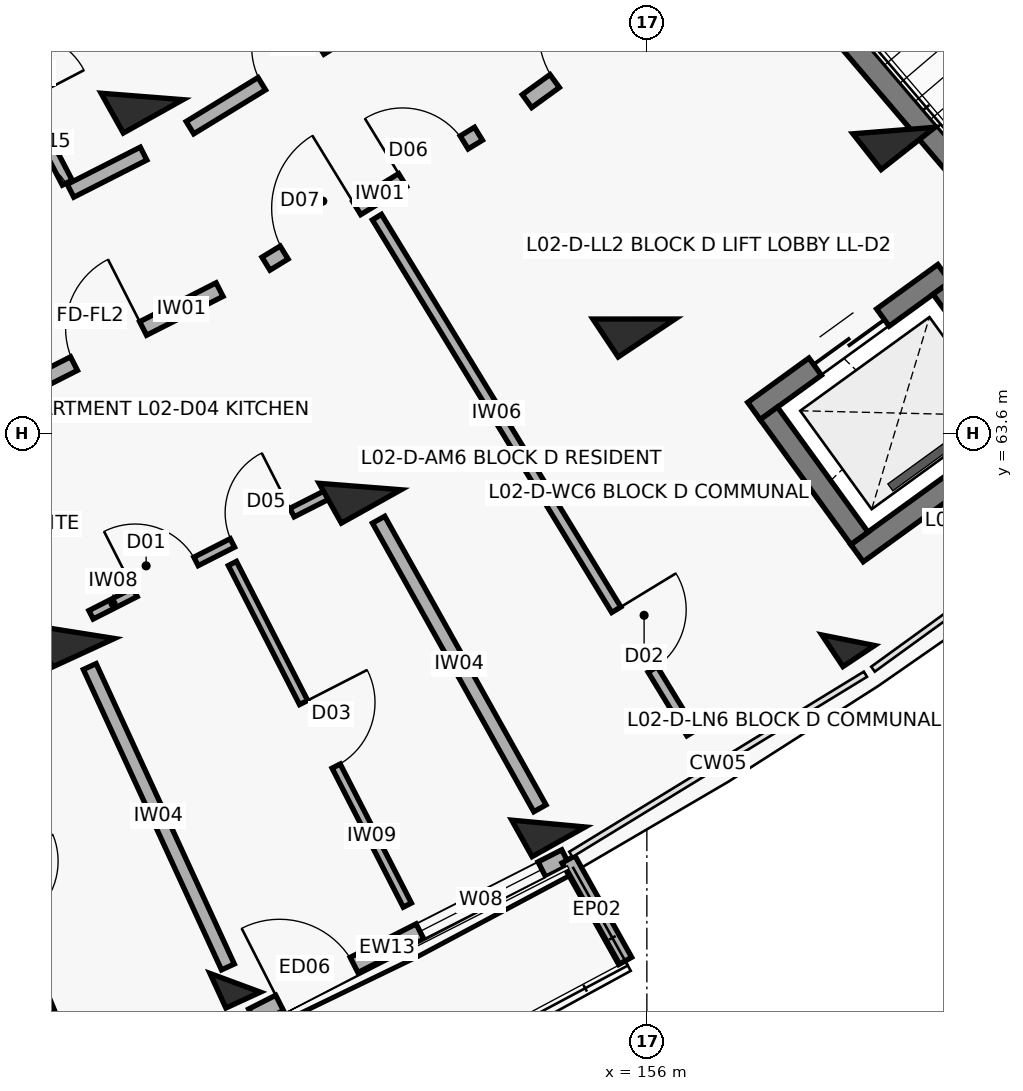
"""IFC4 building model, lengths in metres.
Left out: names, types, materials, properties, quantities, classifications, styles, units other than length and angle.
Written with IfcOpenShell. Run it as: python <this file> out.ifc"""

import sys

from ifc_helpers import new_model, si_unit, direction, frame, frame_2d, origin, origin_2d, place, context, subcontext, project, spatial, rectangle, extrude, element, fill, save


model = new_model("IFC4")
c1 = context("Model", 3, precision=1e-05, world=origin(), true_north=direction((0.0, 1.0)))
c2 = subcontext(c1, "Body", "Model", "MODEL_VIEW")
j1 = project(units=[si_unit("LENGTHUNIT", "METRE"), si_unit("PLANEANGLEUNIT", "RADIAN")], contexts=[c1])
p1 = place(None, origin())
s1 = spatial("IfcSite", under=j1, at=p1, CompositionType="ELEMENT")
p2 = place(p1, origin())
s2 = spatial("IfcBuilding", under=s1, at=p2, CompositionType="ELEMENT")
p3 = place(p2, frame((0.0, 0.0, 8.1)))
s3 = spatial("IfcBuildingStorey", under=s2, at=p3, CompositionType="ELEMENT", Elevation=8.1)
p4 = place(p3, frame((148.461, 60.982, 0.0), z_axis=(0.0, 0.0, 1.0), x_axis=(0.417867073801, -0.908508177527, 0.0)))
e1 = element("IfcColumn", 1, at=p4, inside=s3, PredefinedType="COLUMN", context=c2, shape_type="SweptSolid", body=[
    extrude(rectangle(XDim=0.6, YDim=0.9, at=origin_2d()), origin(), (0.0, 0.0, 1.0), 3.1),
])
p5 = place(p3, frame((150.584, 56.367, 0.0), z_axis=(0.0, 0.0, 1.0), x_axis=(0.417867073801, -0.908508177527, 0.0)))
e2 = element("IfcColumn", 2, at=p5, inside=s3, PredefinedType="COLUMN", context=c2, shape_type="SweptSolid", body=[
    extrude(rectangle(XDim=0.5, YDim=0.5, at=origin_2d()), origin(), (0.0, 0.0, 1.0), 3.1),
])
for number, where, z_axis, x_axis in (
    (3, (149.358, 68.03, 0.0), (0.0, 0.0, 1.0), (0.488, -0.873, 0.0)),
    (4, (152.227, 62.897, 0.0), (0.0, 0.0, 1.0), (0.488, -0.873, 0.0)),
):
    element("IfcColumn", number, at=place(p3, frame(where, z_axis=z_axis, x_axis=x_axis)), inside=s3, PredefinedType="COLUMN", context=c2, shape_type="SweptSolid", body=[
        extrude(rectangle(XDim=0.6, YDim=0.9, at=origin_2d()), origin(), (0.0, 0.0, 1.0), 3.1),
    ])
p6 = place(p3, frame((154.705, 58.462, 0.0), z_axis=(0.0, 0.0, 1.0), x_axis=(0.487859659139, -0.87292207727, 0.0)))
e5 = element("IfcColumn", 5, at=p6, inside=s3, PredefinedType="COLUMN", context=c2, shape_type="SweptSolid", body=[
    extrude(rectangle(XDim=0.55, YDim=0.8, at=origin_2d()), origin(), (0.0, 0.0, 1.0), 3.1),
])
p7 = place(p3, frame((155.831, 65.101, 0.0), z_axis=(0.0, 0.0, 1.0), x_axis=(0.554844427448, -0.83195412213, 0.0)))
e6 = element("IfcColumn", 6, at=p7, inside=s3, PredefinedType="COLUMN", context=c2, shape_type="SweptSolid", body=[
    extrude(rectangle(XDim=0.6, YDim=0.9, at=origin_2d()), origin(), (0.0, 0.0, 1.0), 3.1),
])
p8 = place(p3, frame((158.649, 60.875, 0.0), z_axis=(0.0, 0.0, 1.0), x_axis=(0.554844427448, -0.83195412213, 0.0)))
e7 = element("IfcColumn", 7, at=p8, inside=s3, PredefinedType="COLUMN", context=c2, shape_type="SweptSolid", body=[
    extrude(rectangle(XDim=0.5, YDim=0.5, at=origin_2d()), origin(), (0.0, 0.0, 1.0), 3.1),
])
p9 = place(p3, frame((159.25, 67.581, 0.0), z_axis=(0.0, 0.0, 1.0), x_axis=(0.618408395358, -0.785856893175, 0.0)))
e8 = element("IfcColumn", 8, at=p9, inside=s3, PredefinedType="COLUMN", context=c2, shape_type="SweptSolid", body=[
    extrude(rectangle(XDim=0.6, YDim=0.9, at=origin_2d()), origin(), (0.0, 0.0, 1.0), 3.1),
])
p10 = place(p3, frame((150.811, 55.922, 0.0), z_axis=(0.0, 0.0, 1.0), x_axis=(0.891407190547, 0.453203288428, 0.0)))
e9 = element("IfcWall", 9, at=p10, inside=s3, PredefinedType="SOLIDWALL", context=c2, shape_type="SweptSolid", body=[
    extrude(rectangle(XDim=4.623, YDim=0.224, at=frame_2d((2.311, 0.0))), origin(), (0.0, 0.0, 1.0), 2.25),
])
p11 = place(p10, frame((0.4, 0.0, 0.0)))
e10 = element("IfcOpeningElement", 10, at=p11, cuts=e9, PredefinedType="OPENING", context=c2, shape_type="SweptSolid", body=[
    extrude(rectangle(XDim=1.1, YDim=2.15, at=frame_2d((0.55, 1.075))), frame((0.0, 0.122, 0.0), z_axis=(0.0, -1.0, 0.0), x_axis=(1.0, 0.0, 0.0)), (0.0, 0.0, 1.0), 0.244),
])
p12 = place(p10, frame((2.472, 0.0, 0.35)))
e11 = element("IfcOpeningElement", 11, at=p12, cuts=e9, PredefinedType="OPENING", context=c2, shape_type="SweptSolid", body=[
    extrude(rectangle(XDim=1.8, YDim=1.65, at=frame_2d((0.9, 0.825))), frame((0.0, 0.122, 0.0), z_axis=(0.0, -1.0, 0.0), x_axis=(1.0, 0.0, 0.0)), (0.0, 0.0, 1.0), 0.244),
])
p13 = place(p3, frame((154.969, 57.991, 0.0), z_axis=(0.0, 0.0, 1.0), x_axis=(0.487971560724, -0.872859528175, 0.0)))
e12 = element("IfcWall", 12, at=p13, inside=s3, PredefinedType="PARAPET", context=c2, shape_type="SweptSolid", body=[
    extrude(rectangle(XDim=1.53, YDim=0.195, at=frame_2d((0.765, 0.0))), origin(), (0.0, 0.0, 1.0), 2.25),
])
p14 = place(p3, frame((157.583, 70.041, 0.0), z_axis=(0.0, 0.0, 1.0), x_axis=(0.648762810187, -0.760990680704, 0.0)))
e13 = element("IfcWall", 13, at=p14, inside=s3, PredefinedType="SHEAR", context=c2, shape_type="SweptSolid", body=[
    extrude(rectangle(XDim=7.69, YDim=0.3, at=frame_2d((3.845, 0.0))), origin(), (0.0, 0.0, 1.0), 3.1),
])
p15 = place(p3, frame((157.409, 63.89, 0.0), z_axis=(0.0, 0.0, 1.0), x_axis=(0.809510936031, 0.587104798521, 0.0)))
e14 = element("IfcWall", 14, at=p15, inside=s3, PredefinedType="SHEAR", context=c2, shape_type="SweptSolid", body=[
    extrude(rectangle(XDim=3.09, YDim=0.28, at=frame_2d((1.545, 0.0))), origin(), (0.0, 0.0, 1.0), 3.1),
])
p16 = place(p15, frame((0.995, 0.0, 0.0)))
e15 = element("IfcOpeningElement", 15, at=p16, cuts=e14, PredefinedType="OPENING", context=c2, shape_type="SweptSolid", body=[
    extrude(rectangle(XDim=1.1, YDim=2.15, at=frame_2d((0.55, 1.075))), frame((0.0, 0.15, 0.0), z_axis=(0.0, -1.0, 0.0), x_axis=(1.0, 0.0, 0.0)), (0.0, 0.0, 1.0), 0.3),
])
p17 = place(p3, frame((158.765, 62.021, 0.0), z_axis=(0.0, 0.0, 1.0), x_axis=(0.809548485838, 0.587053020669, 0.0)))
e16 = element("IfcWall", 16, at=p17, inside=s3, PredefinedType="SHEAR", context=c2, shape_type="SweptSolid", body=[
    extrude(rectangle(XDim=3.09, YDim=0.28, at=frame_2d((1.545, 0.0))), origin(), (0.0, 0.0, 1.0), 3.1),
])
p18 = place(p3, frame((157.604, 63.859, 0.0), z_axis=(0.0, 0.0, 1.0), x_axis=(0.587127188998, -0.809494696671, 0.0)))
e17 = element("IfcWall", 17, at=p18, inside=s3, PredefinedType="SHEAR", context=c2, shape_type="SweptSolid", body=[
    extrude(rectangle(XDim=2.03, YDim=0.28, at=frame_2d((1.015, 0.0))), origin(), (0.0, 0.0, 1.0), 3.1),
])
p19 = place(p3, frame((159.879, 65.509, 0.0), z_axis=(0.0, 0.0, 1.0), x_axis=(0.58704837408, -0.809551855344, 0.0)))
e18 = element("IfcWall", 18, at=p19, inside=s3, PredefinedType="SHEAR", context=c2, shape_type="SweptSolid", body=[
    extrude(rectangle(XDim=2.03, YDim=0.28, at=frame_2d((1.015, 0.0))), origin(), (0.0, 0.0, 1.0), 3.1),
])
p20 = place(p3, frame((144.903, 59.296, 0.0), z_axis=(0.0, 0.0, 1.0), x_axis=(0.924207914011, 0.381889685223, 0.0)))
e19 = element("IfcWall", 19, at=p20, inside=s3, PredefinedType="PARTITIONING", context=c2, shape_type="SweptSolid", body=[
    extrude(rectangle(XDim=3.64, YDim=0.13, at=frame_2d((1.82, 0.0))), origin(), (0.0, 0.0, 1.0), 2.08),
])
p21 = place(p20, frame((0.65, 0.0, 0.0)))
e20 = element("IfcOpeningElement", 20, at=p21, cuts=e19, PredefinedType="OPENING", context=c2, shape_type="SweptSolid", body=[
    extrude(rectangle(XDim=0.9, YDim=2.1, at=frame_2d((0.45, 1.05))), frame((0.0, 0.075, 0.0), z_axis=(0.0, -1.0, 0.0), x_axis=(1.0, 0.0, 0.0)), (0.0, 0.0, 1.0), 0.15),
])
p22 = place(p20, frame((2.11, 0.0, 0.0)))
e21 = element("IfcOpeningElement", 21, at=p22, cuts=e19, PredefinedType="OPENING", context=c2, shape_type="SweptSolid", body=[
    extrude(rectangle(XDim=0.88, YDim=2.1, at=frame_2d((0.44, 1.05))), frame((0.0, 0.075, 0.0), z_axis=(0.0, -1.0, 0.0), x_axis=(1.0, 0.0, 0.0)), (0.0, 0.0, 1.0), 0.15),
])
p23 = place(p3, frame((146.605, 59.738, 0.0), z_axis=(0.0, 0.0, 1.0), x_axis=(0.380553327256, -0.924758976769, 0.0)))
e22 = element("IfcWall", 22, at=p23, inside=s3, PredefinedType="PARTITIONING", context=c2, shape_type="SweptSolid", body=[
    extrude(rectangle(XDim=4.75, YDim=0.12, at=frame_2d((2.375, 0.0))), origin(), (0.0, 0.0, 1.0), 2.08),
])
p24 = place(p23, frame((1.915, 0.0, 0.0)))
e23 = element("IfcOpeningElement", 23, at=p24, cuts=e22, PredefinedType="OPENING", context=c2, shape_type="SweptSolid", body=[
    extrude(rectangle(XDim=0.92, YDim=2.1, at=frame_2d((0.46, 1.05))), frame((0.0, 0.07, 0.0), z_axis=(0.0, -1.0, 0.0), x_axis=(1.0, 0.0, 0.0)), (0.0, 0.0, 1.0), 0.14),
])
p25 = place(p3, frame((147.457, 64.003, 0.0), z_axis=(0.0, 0.0, 1.0), x_axis=(0.891412167565, 0.45319349898, 0.0)))
e24 = element("IfcWall", 24, at=p25, inside=s3, PredefinedType="SOLIDWALL", context=c2, shape_type="SweptSolid", body=[
    extrude(rectangle(XDim=3.277, YDim=0.2, at=frame_2d((1.639, 0.0))), origin(), (0.0, 0.0, 1.0), 2.08),
])
p26 = place(p25, frame((1.128, 0.0, 0.0)))
e25 = element("IfcOpeningElement", 25, at=p26, cuts=e24, PredefinedType="OPENING", context=c2, shape_type="SweptSolid", body=[
    extrude(rectangle(XDim=1.02, YDim=2.15, at=frame_2d((0.51, 1.075))), frame((0.0, 0.11, 0.0), z_axis=(0.0, -1.0, 0.0), x_axis=(1.0, 0.0, 0.0)), (0.0, 0.0, 1.0), 0.22),
])
p27 = place(p3, frame((146.6, 65.865, 0.0), z_axis=(0.0, 0.0, 1.0), x_axis=(0.891414101388, 0.453189695212, 0.0)))
e26 = element("IfcWall", 26, at=p27, inside=s3, PredefinedType="SOLIDWALL", context=c2, shape_type="SweptSolid", body=[
    extrude(rectangle(XDim=3.116, YDim=0.19, at=frame_2d((1.558, 0.0))), origin(), (0.0, 0.0, 1.0), 2.08),
])
p28 = place(p27, frame((1.078, 0.0, 0.0)))
e27 = element("IfcOpeningElement", 27, at=p28, cuts=e26, PredefinedType="OPENING", context=c2, shape_type="SweptSolid", body=[
    extrude(rectangle(XDim=0.96, YDim=2.1, at=frame_2d((0.48, 1.05))), frame((0.0, 0.105, 0.0), z_axis=(0.0, -1.0, 0.0), x_axis=(1.0, 0.0, 0.0)), (0.0, 0.0, 1.0), 0.21),
])
p29 = place(p3, frame((146.849, 69.822, 0.0), z_axis=(0.0, 0.0, 1.0), x_axis=(0.462242343884, -0.886753638572, 0.0)))
e28 = element("IfcWall", 28, at=p29, inside=s3, PredefinedType="PARTITIONING", context=c2, shape_type="SweptSolid", body=[
    extrude(rectangle(XDim=3.3, YDim=0.145, at=frame_2d((1.65, 0.0))), origin(), (0.0, 0.0, 1.0), 2.08),
])
p30 = place(p29, frame((1.21, 0.0, 0.0)))
e29 = element("IfcOpeningElement", 29, at=p30, cuts=e28, PredefinedType="OPENING", context=c2, shape_type="SweptSolid", body=[
    extrude(rectangle(XDim=0.88, YDim=2.1, at=frame_2d((0.44, 1.05))), frame((0.0, 0.083, 0.0), z_axis=(0.0, -1.0, 0.0), x_axis=(1.0, 0.0, 0.0)), (0.0, 0.0, 1.0), 0.165),
])
p31 = place(p3, frame((148.687, 61.209, 0.0), z_axis=(0.0, 0.0, 1.0), x_axis=(0.891396224028, 0.453224857866, 0.0)))
e30 = element("IfcWall", 30, at=p31, inside=s3, PredefinedType="PARTITIONING", context=c2, shape_type="SweptSolid", body=[
    extrude(rectangle(XDim=3.617, YDim=0.125, at=frame_2d((1.808, 0.0))), origin(), (0.0, 0.0, 1.0), 2.08),
])
p32 = place(p31, frame((0.65, 0.0, 0.0)))
e31 = element("IfcOpeningElement", 31, at=p32, cuts=e30, PredefinedType="OPENING", context=c2, shape_type="SweptSolid", body=[
    extrude(rectangle(XDim=0.9, YDim=2.1, at=frame_2d((0.45, 1.05))), frame((0.0, 0.073, 0.0), z_axis=(0.0, -1.0, 0.0), x_axis=(1.0, 0.0, 0.0)), (0.0, 0.0, 1.0), 0.145),
])
p33 = place(p31, frame((2.086, 0.0, 0.0)))
e32 = element("IfcOpeningElement", 32, at=p33, cuts=e30, PredefinedType="OPENING", context=c2, shape_type="SweptSolid", body=[
    extrude(rectangle(XDim=0.88, YDim=2.1, at=frame_2d((0.44, 1.05))), frame((0.0, 0.073, 0.0), z_axis=(0.0, -1.0, 0.0), x_axis=(1.0, 0.0, 0.0)), (0.0, 0.0, 1.0), 0.145),
])
p34 = place(p3, frame((150.547, 61.884, 0.0), z_axis=(0.0, 0.0, 1.0), x_axis=(0.455778725258, -0.89009311513, 0.0)))
e33 = element("IfcWall", 33, at=p34, inside=s3, PredefinedType="PARTITIONING", context=c2, shape_type="SweptSolid", body=[
    extrude(rectangle(XDim=5.05, YDim=0.12, at=frame_2d((2.525, 0.0))), origin(), (0.0, 0.0, 1.0), 2.08),
])
p35 = place(p34, frame((2.055, 0.0, 0.0)))
e34 = element("IfcOpeningElement", 34, at=p35, cuts=e33, PredefinedType="OPENING", context=c2, shape_type="SweptSolid", body=[
    extrude(rectangle(XDim=0.94, YDim=2.1, at=frame_2d((0.47, 1.05))), frame((0.0, 0.07, 0.0), z_axis=(0.0, -1.0, 0.0), x_axis=(1.0, 0.0, 0.0)), (0.0, 0.0, 1.0), 0.14),
])
p36 = place(p3, frame((148.67, 60.528, 0.0), z_axis=(0.0, 0.0, 1.0), x_axis=(0.417837051164, -0.908521985796, 0.0)))
e35 = element("IfcWall", 35, at=p36, inside=s3, PredefinedType="SOLIDWALL", context=c2, shape_type="SweptSolid", body=[
    extrude(rectangle(XDim=4.35, YDim=0.185, at=frame_2d((2.175, 0.0))), origin(), (0.0, 0.0, 1.0), 2.08),
])
p37 = place(p3, frame((150.989, 65.829, 0.0), z_axis=(0.0, 0.0, 1.0), x_axis=(0.853090237845, 0.521763400492, 0.0)))
e36 = element("IfcWall", 36, at=p37, inside=s3, PredefinedType="SOLIDWALL", context=c2, shape_type="SweptSolid", body=[
    extrude(rectangle(XDim=3.277, YDim=0.2, at=frame_2d((1.638, 0.0))), origin(), (0.0, 0.0, 1.0), 2.08),
])
p38 = place(p37, frame((0.28, 0.0, 0.0)))
e37 = element("IfcOpeningElement", 37, at=p38, cuts=e36, PredefinedType="OPENING", context=c2, shape_type="SweptSolid", body=[
    extrude(rectangle(XDim=1.12, YDim=2.15, at=frame_2d((0.56, 1.075))), frame((0.0, 0.11, 0.0), z_axis=(0.0, -1.0, 0.0), x_axis=(1.0, 0.0, 0.0)), (0.0, 0.0, 1.0), 0.22),
])
p39 = place(p37, frame((2.107, 0.0, 0.0)))
e38 = element("IfcOpeningElement", 38, at=p39, cuts=e36, PredefinedType="OPENING", context=c2, shape_type="SweptSolid", body=[
    extrude(rectangle(XDim=0.95, YDim=2.1, at=frame_2d((0.475, 1.05))), frame((0.0, 0.11, 0.0), z_axis=(0.0, -1.0, 0.0), x_axis=(1.0, 0.0, 0.0)), (0.0, 0.0, 1.0), 0.22),
])
p40 = place(p3, frame((149.989, 67.619, 0.0), z_axis=(0.0, 0.0, 1.0), x_axis=(0.853121049608, 0.5217130195, 0.0)))
e39 = element("IfcWall", 39, at=p40, inside=s3, PredefinedType="SOLIDWALL", context=c2, shape_type="SweptSolid", body=[
    extrude(rectangle(XDim=3.116, YDim=0.19, at=frame_2d((1.558, 0.0))), origin(), (0.0, 0.0, 1.0), 2.08),
])
p41 = place(p40, frame((1.108, 0.0, 0.0)))
e40 = element("IfcOpeningElement", 40, at=p41, cuts=e39, PredefinedType="OPENING", context=c2, shape_type="SweptSolid", body=[
    extrude(rectangle(XDim=0.9, YDim=2.1, at=frame_2d((0.45, 1.05))), frame((0.0, 0.105, 0.0), z_axis=(0.0, -1.0, 0.0), x_axis=(1.0, 0.0, 0.0)), (0.0, 0.0, 1.0), 0.21),
])
p42 = place(p3, frame((152.448, 66.442, 0.0), z_axis=(0.0, 0.0, 1.0), x_axis=(0.520511872578, -0.853854431683, 0.0)))
e41 = element("IfcWall", 41, at=p42, inside=s3, PredefinedType="PARTITIONING", context=c2, shape_type="SweptSolid", body=[
    extrude(rectangle(XDim=7.95, YDim=0.14, at=frame_2d((3.975, 0.0))), origin(), (0.0, 0.0, 1.0), 2.08),
])
p43 = place(p42, frame((6.05, 0.0, 0.0)))
e42 = element("IfcOpeningElement", 42, at=p43, cuts=e41, PredefinedType="OPENING", context=c2, shape_type="SweptSolid", body=[
    extrude(rectangle(XDim=0.92, YDim=2.1, at=frame_2d((0.46, 1.05))), frame((0.0, 0.08, 0.0), z_axis=(0.0, -1.0, 0.0), x_axis=(1.0, 0.0, 0.0)), (0.0, 0.0, 1.0), 0.16),
])
p44 = place(p3, frame((152.471, 62.46, 0.0), z_axis=(0.0, 0.0, 1.0), x_axis=(0.487866639184, -0.872918176218, 0.0)))
e43 = element("IfcWall", 43, at=p44, inside=s3, PredefinedType="SOLIDWALL", context=c2, shape_type="SweptSolid", body=[
    extrude(rectangle(XDim=4.35, YDim=0.185, at=frame_2d((2.175, 0.0))), origin(), (0.0, 0.0, 1.0), 2.08),
])
p45 = place(p3, frame((154.423, 67.968, 0.0), z_axis=(0.0, 0.0, 1.0), x_axis=(0.809516127005, 0.587097641043, 0.0)))
e44 = element("IfcWall", 44, at=p45, inside=s3, PredefinedType="SOLIDWALL", context=c2, shape_type="SweptSolid", body=[
    extrude(rectangle(XDim=3.137, YDim=0.21, at=frame_2d((1.569, 0.0))), origin(), (0.0, 0.0, 1.0), 2.08),
])
p46 = place(p45, frame((0.45, 0.0, 0.0)))
e45 = element("IfcOpeningElement", 45, at=p46, cuts=e44, PredefinedType="OPENING", context=c2, shape_type="SweptSolid", body=[
    extrude(rectangle(XDim=1.1, YDim=2.15, at=frame_2d((0.55, 1.075))), frame((0.0, 0.115, 0.0), z_axis=(0.0, -1.0, 0.0), x_axis=(1.0, 0.0, 0.0)), (0.0, 0.0, 1.0), 0.23),
])
p47 = place(p45, frame((1.567, 0.0, 0.0)))
e46 = element("IfcOpeningElement", 46, at=p47, cuts=e44, PredefinedType="OPENING", context=c2, shape_type="SweptSolid", body=[
    extrude(rectangle(XDim=1.12, YDim=2.15, at=frame_2d((0.56, 1.075))), frame((0.0, 0.115, 0.0), z_axis=(0.0, -1.0, 0.0), x_axis=(1.0, 0.0, 0.0)), (0.0, 0.0, 1.0), 0.23),
])
p48 = place(p11, origin())
e47 = element("IfcDoor", 47, at=p48, inside=s3, OperationType="SINGLE_SWING_LEFT", PredefinedType="DOOR", context=c2, shape_type="SweptSolid", body=[
    extrude(rectangle(XDim=1.1, YDim=2.15, at=frame_2d((0.55, 1.075))), frame((0.0, 0.025, 0.0), z_axis=(0.0, -1.0, 0.0), x_axis=(1.0, 0.0, 0.0)), (0.0, 0.0, 1.0), 0.05),
])
fill(e10, e47)
p49 = place(p12, origin())
e48 = element("IfcWindow", 48, at=p49, inside=s3, PartitioningType="TRIPLE_PANEL_VERTICAL", PredefinedType="WINDOW", context=c2, shape_type="SweptSolid", body=[
    extrude(rectangle(XDim=1.8, YDim=1.65, at=frame_2d((0.9, 0.825))), frame((0.0, 0.03, 0.0), z_axis=(0.0, -1.0, 0.0), x_axis=(1.0, 0.0, 0.0)), (0.0, 0.0, 1.0), 0.06),
])
fill(e11, e48)
p50 = place(p16, origin())
e49 = element("IfcDoor", 49, at=p50, inside=s3, OperationType="DOUBLE_DOOR_SLIDING", PredefinedType="DOOR", context=c2, shape_type="SweptSolid", body=[
    extrude(rectangle(XDim=1.1, YDim=2.15, at=frame_2d((0.55, 1.075))), frame((0.0, 0.025, 0.0), z_axis=(0.0, -1.0, 0.0), x_axis=(1.0, 0.0, 0.0)), (0.0, 0.0, 1.0), 0.05),
])
fill(e15, e49)
p51 = place(p26, origin())
e50 = element("IfcDoor", 50, at=p51, inside=s3, OperationType="SINGLE_SWING_RIGHT", PredefinedType="DOOR", context=c2, shape_type="SweptSolid", body=[
    extrude(rectangle(XDim=1.02, YDim=2.15, at=frame_2d((0.51, 1.075))), frame((0.0, 0.025, 0.0), z_axis=(0.0, -1.0, 0.0), x_axis=(1.0, 0.0, 0.0)), (0.0, 0.0, 1.0), 0.05),
])
fill(e25, e50)
p52 = place(p28, origin())
e51 = element("IfcDoor", 51, at=p52, inside=s3, OperationType="SINGLE_SWING_LEFT", PredefinedType="DOOR", context=c2, shape_type="SweptSolid", body=[
    extrude(rectangle(XDim=0.96, YDim=2.1, at=frame_2d((0.48, 1.05))), frame((0.0, 0.025, 0.0), z_axis=(0.0, -1.0, 0.0), x_axis=(1.0, 0.0, 0.0)), (0.0, 0.0, 1.0), 0.05),
])
fill(e27, e51)
p53 = place(p32, origin())
e52 = element("IfcDoor", 52, at=p53, inside=s3, OperationType="SINGLE_SWING_LEFT", PredefinedType="DOOR", context=c2, shape_type="SweptSolid", body=[
    extrude(rectangle(XDim=0.9, YDim=2.1, at=frame_2d((0.45, 1.05))), frame((0.0, 0.025, 0.0), z_axis=(0.0, -1.0, 0.0), x_axis=(1.0, 0.0, 0.0)), (0.0, 0.0, 1.0), 0.05),
])
fill(e31, e52)
p54 = place(p33, origin())
e53 = element("IfcDoor", 53, at=p54, inside=s3, OperationType="SINGLE_SWING_RIGHT", PredefinedType="DOOR", context=c2, shape_type="SweptSolid", body=[
    extrude(rectangle(XDim=0.88, YDim=2.1, at=frame_2d((0.44, 1.05))), frame((0.0, 0.025, 0.0), z_axis=(0.0, -1.0, 0.0), x_axis=(1.0, 0.0, 0.0)), (0.0, 0.0, 1.0), 0.05),
])
fill(e32, e53)
p55 = place(p35, origin())
e54 = element("IfcDoor", 54, at=p55, inside=s3, OperationType="SINGLE_SWING_LEFT", PredefinedType="DOOR", context=c2, shape_type="SweptSolid", body=[
    extrude(rectangle(XDim=0.94, YDim=2.1, at=frame_2d((0.47, 1.05))), frame((0.0, 0.025, 0.0), z_axis=(0.0, -1.0, 0.0), x_axis=(1.0, 0.0, 0.0)), (0.0, 0.0, 1.0), 0.05),
])
fill(e34, e54)
p56 = place(p38, origin())
e55 = element("IfcDoor", 55, at=p56, inside=s3, OperationType="SINGLE_SWING_RIGHT", PredefinedType="DOOR", context=c2, shape_type="SweptSolid", body=[
    extrude(rectangle(XDim=1.12, YDim=2.15, at=frame_2d((0.56, 1.075))), frame((0.0, 0.025, 0.0), z_axis=(0.0, -1.0, 0.0), x_axis=(1.0, 0.0, 0.0)), (0.0, 0.0, 1.0), 0.05),
])
fill(e37, e55)
p57 = place(p39, origin())
e56 = element("IfcDoor", 56, at=p57, inside=s3, OperationType="SINGLE_SWING_LEFT", PredefinedType="DOOR", context=c2, shape_type="SweptSolid", body=[
    extrude(rectangle(XDim=0.95, YDim=2.1, at=frame_2d((0.475, 1.05))), frame((0.0, 0.025, 0.0), z_axis=(0.0, -1.0, 0.0), x_axis=(1.0, 0.0, 0.0)), (0.0, 0.0, 1.0), 0.05),
])
fill(e38, e56)
p58 = place(p41, origin())
e57 = element("IfcDoor", 57, at=p58, inside=s3, OperationType="SINGLE_SWING_RIGHT", PredefinedType="DOOR", context=c2, shape_type="SweptSolid", body=[
    extrude(rectangle(XDim=0.9, YDim=2.1, at=frame_2d((0.45, 1.05))), frame((0.0, 0.025, 0.0), z_axis=(0.0, -1.0, 0.0), x_axis=(1.0, 0.0, 0.0)), (0.0, 0.0, 1.0), 0.05),
])
fill(e40, e57)
p59 = place(p43, origin())
e58 = element("IfcDoor", 58, at=p59, inside=s3, OperationType="SINGLE_SWING_LEFT", PredefinedType="DOOR", context=c2, shape_type="SweptSolid", body=[
    extrude(rectangle(XDim=0.92, YDim=2.1, at=frame_2d((0.46, 1.05))), frame((0.0, 0.025, 0.0), z_axis=(0.0, -1.0, 0.0), x_axis=(1.0, 0.0, 0.0)), (0.0, 0.0, 1.0), 0.05),
])
fill(e42, e58)
p60 = place(p46, origin())
e59 = element("IfcDoor", 59, at=p60, inside=s3, OperationType="SINGLE_SWING_RIGHT", PredefinedType="DOOR", context=c2, shape_type="SweptSolid", body=[
    extrude(rectangle(XDim=1.1, YDim=2.15, at=frame_2d((0.55, 1.075))), frame((0.0, 0.025, 0.0), z_axis=(0.0, -1.0, 0.0), x_axis=(1.0, 0.0, 0.0)), (0.0, 0.0, 1.0), 0.05),
])
fill(e45, e59)
save(model, sys.argv[1])
